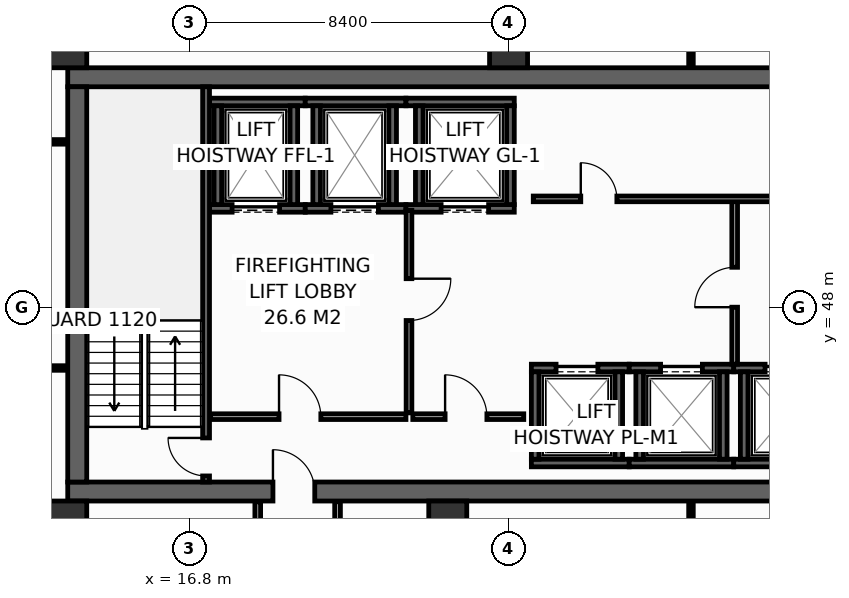
"""IFC4 building model, lengths in metres.
Left out: names, types, materials, properties, quantities, classifications, styles, units other than length and angle.
Written with IfcOpenShell. Run it as: python <this file> out.ifc"""

import sys

from ifc_helpers import new_model, si_unit, direction, frame, frame_2d, origin, origin_2d, place, context, subcontext, project, spatial, rectangle, hollow_rectangle, extrude, element, fill, save


model = new_model("IFC4")
c1 = context("Model", 3, precision=1e-05, world=origin(), true_north=direction((0.0, 1.0)))
c2 = subcontext(c1, "Body", "Model", "MODEL_VIEW")
j1 = project(units=[si_unit("LENGTHUNIT", "METRE"), si_unit("PLANEANGLEUNIT", "RADIAN")], contexts=[c1])
p1 = place(None, origin())
s1 = spatial("IfcSite", under=j1, at=p1, CompositionType="ELEMENT")
p2 = place(p1, origin())
s2 = spatial("IfcBuilding", under=s1, at=p2, CompositionType="ELEMENT")
p3 = place(p2, frame((0.0, 0.0, 141.0)))
s3 = spatial("IfcBuildingStorey", under=s2, at=p3, CompositionType="ELEMENT", Elevation=141.0)
p4 = place(p3, frame((13.6, 43.15, 0.0), z_axis=(0.0, 0.0, 1.0), x_axis=(1.0, 0.0, 0.0)))
e1 = element("IfcWall", 1, at=p4, inside=s3, PredefinedType="SHEAR", context=c2, shape_type="SweptSolid", body=[
    extrude(rectangle(XDim=32.7, YDim=0.5, at=frame_2d((16.35, 0.0))), origin(), (0.0, 0.0, 1.0), 3.55),
])
p5 = place(p4, frame((5.4, 0.0, 0.0)))
e2 = element("IfcOpeningElement", 2, at=p5, cuts=e1, PredefinedType="OPENING", context=c2, shape_type="SweptSolid", body=[
    extrude(rectangle(XDim=1.1, YDim=2.15, at=frame_2d((0.55, 1.075))), frame((0.0, 0.26, 0.0), z_axis=(0.0, -1.0, 0.0), x_axis=(1.0, 0.0, 0.0)), (0.0, 0.0, 1.0), 0.52),
])
p6 = place(p4, frame((25.6, 0.0, 0.0)))
e3 = element("IfcOpeningElement", 3, at=p6, cuts=e1, PredefinedType="OPENING", context=c2, shape_type="SweptSolid", body=[
    extrude(rectangle(XDim=1.1, YDim=2.15, at=frame_2d((0.55, 1.075))), frame((0.0, 0.26, 0.0), z_axis=(0.0, -1.0, 0.0), x_axis=(1.0, 0.0, 0.0)), (0.0, 0.0, 1.0), 0.52),
])
p7 = place(p3, frame((13.6, 54.05, 0.0), z_axis=(0.0, 0.0, 1.0), x_axis=(1.0, 0.0, 0.0)))
e4 = element("IfcWall", 4, at=p7, inside=s3, PredefinedType="SHEAR", context=c2, shape_type="SweptSolid", body=[
    extrude(rectangle(XDim=32.7, YDim=0.5, at=frame_2d((16.35, 0.0))), origin(), (0.0, 0.0, 1.0), 3.55),
])
p8 = place(p3, frame((13.85, 43.4, 0.0), z_axis=(0.0, 0.0, 1.0), x_axis=(0.0, 1.0, 0.0)))
e5 = element("IfcWall", 5, at=p8, inside=s3, PredefinedType="SHEAR", context=c2, shape_type="SweptSolid", body=[
    extrude(rectangle(XDim=10.4, YDim=0.5, at=frame_2d((5.2, 0.0))), origin(), (0.0, 0.0, 1.0), 3.55),
])
for number, where, z_axis, x_axis in (
    (6, (13.6, 54.8, 0.0), (0.0, 0.0, 1.0), (1.0, 0.0, 0.0)),
    (7, (25.2, 54.8, 0.0), (0.0, 0.0, 1.0), (1.0, 0.0, 0.0)),
    (8, (13.6, 42.4, 0.0), (0.0, 0.0, 1.0), (1.0, 0.0, 0.0)),
    (9, (23.6, 42.4, 0.0), (0.0, 0.0, 1.0), (1.0, 0.0, 0.0)),
):
    element("IfcColumn", number, at=place(p3, frame(where, z_axis=z_axis, x_axis=x_axis)), inside=s3, PredefinedType="COLUMN", context=c2, shape_type="SweptSolid", body=[
        extrude(hollow_rectangle(XDim=1.0, YDim=1.0, WallThickness=0.045, at=origin_2d()), origin(), (0.0, 0.0, 1.0), 3.8),
    ])
p9 = place(p3, frame((17.33, 50.6, 0.0), z_axis=(0.0, 0.0, 1.0), x_axis=(1.0, 0.0, 0.0)))
e10 = element("IfcWall", 10, at=p9, inside=s3, PredefinedType="SHEAR", context=c2, shape_type="SweptSolid", body=[
    extrude(rectangle(XDim=2.52, YDim=0.2, at=frame_2d((1.26, 0.0))), origin(), (0.0, 0.0, 1.0), 3.55),
])
p10 = place(p9, frame((0.595, 0.0, 0.0)))
e11 = element("IfcOpeningElement", 11, at=p10, cuts=e10, PredefinedType="OPENING", context=c2, shape_type="SweptSolid", body=[
    extrude(rectangle(XDim=1.25, YDim=2.3, at=frame_2d((0.625, 1.15))), frame((0.0, 0.11, 0.0), z_axis=(0.0, -1.0, 0.0), x_axis=(1.0, 0.0, 0.0)), (0.0, 0.0, 1.0), 0.22),
])
p11 = place(p3, frame((17.33, 53.4, 0.0), z_axis=(0.0, 0.0, 1.0), x_axis=(1.0, 0.0, 0.0)))
e12 = element("IfcWall", 12, at=p11, inside=s3, PredefinedType="SHEAR", context=c2, shape_type="SweptSolid", body=[
    extrude(rectangle(XDim=2.52, YDim=0.2, at=frame_2d((1.26, 0.0))), origin(), (0.0, 0.0, 1.0), 3.55),
])
for number, where, z_axis, x_axis in (
    (13, (17.55, 50.7, 0.0), (0.0, 0.0, 1.0), (0.0, 1.0, 0.0)),
    (14, (19.55, 50.7, 0.0), (0.0, 0.0, 1.0), (0.0, 1.0, 0.0)),
):
    element("IfcWall", number, at=place(p3, frame(where, z_axis=z_axis, x_axis=x_axis)), inside=s3, PredefinedType="SHEAR", context=c2, shape_type="SweptSolid", body=[
        extrude(rectangle(XDim=2.6, YDim=0.2, at=frame_2d((1.3, 0.0))), origin(), (0.0, 0.0, 1.0), 3.55),
    ])
p12 = place(p3, frame((19.85, 50.6, 0.0), z_axis=(0.0, 0.0, 1.0), x_axis=(1.0, 0.0, 0.0)))
e15 = element("IfcWall", 15, at=p12, inside=s3, PredefinedType="SHEAR", context=c2, shape_type="SweptSolid", body=[
    extrude(rectangle(XDim=2.65, YDim=0.2, at=frame_2d((1.325, 0.0))), origin(), (0.0, 0.0, 1.0), 3.55),
])
p13 = place(p12, frame((0.675, 0.0, 0.0)))
e16 = element("IfcOpeningElement", 16, at=p13, cuts=e15, PredefinedType="OPENING", context=c2, shape_type="SweptSolid", body=[
    extrude(rectangle(XDim=1.25, YDim=2.3, at=frame_2d((0.625, 1.15))), frame((0.0, 0.11, 0.0), z_axis=(0.0, -1.0, 0.0), x_axis=(1.0, 0.0, 0.0)), (0.0, 0.0, 1.0), 0.22),
])
p14 = place(p3, frame((19.85, 53.4, 0.0), z_axis=(0.0, 0.0, 1.0), x_axis=(1.0, 0.0, 0.0)))
e17 = element("IfcWall", 17, at=p14, inside=s3, PredefinedType="SHEAR", context=c2, shape_type="SweptSolid", body=[
    extrude(rectangle(XDim=2.65, YDim=0.2, at=frame_2d((1.325, 0.0))), origin(), (0.0, 0.0, 1.0), 3.55),
])
for number, where, z_axis, x_axis in (
    (18, (20.15, 50.7, 0.0), (0.0, 0.0, 1.0), (0.0, 1.0, 0.0)),
    (19, (22.15, 50.7, 0.0), (0.0, 0.0, 1.0), (0.0, 1.0, 0.0)),
):
    element("IfcWall", number, at=place(p3, frame(where, z_axis=z_axis, x_axis=x_axis)), inside=s3, PredefinedType="SHEAR", context=c2, shape_type="SweptSolid", body=[
        extrude(rectangle(XDim=2.6, YDim=0.2, at=frame_2d((1.3, 0.0))), origin(), (0.0, 0.0, 1.0), 3.55),
    ])
p15 = place(p3, frame((22.5, 50.6, 0.0), z_axis=(0.0, 0.0, 1.0), x_axis=(1.0, 0.0, 0.0)))
e20 = element("IfcWall", 20, at=p15, inside=s3, PredefinedType="SHEAR", context=c2, shape_type="SweptSolid", body=[
    extrude(rectangle(XDim=2.85, YDim=0.2, at=frame_2d((1.425, 0.0))), origin(), (0.0, 0.0, 1.0), 3.55),
])
p16 = place(p15, frame((0.925, 0.0, 0.0)))
e21 = element("IfcOpeningElement", 21, at=p16, cuts=e20, PredefinedType="OPENING", context=c2, shape_type="SweptSolid", body=[
    extrude(rectangle(XDim=1.25, YDim=2.3, at=frame_2d((0.625, 1.15))), frame((0.0, 0.11, 0.0), z_axis=(0.0, -1.0, 0.0), x_axis=(1.0, 0.0, 0.0)), (0.0, 0.0, 1.0), 0.22),
])
p17 = place(p3, frame((22.5, 53.4, 0.0), z_axis=(0.0, 0.0, 1.0), x_axis=(1.0, 0.0, 0.0)))
e22 = element("IfcWall", 22, at=p17, inside=s3, PredefinedType="SHEAR", context=c2, shape_type="SweptSolid", body=[
    extrude(rectangle(XDim=2.85, YDim=0.2, at=frame_2d((1.425, 0.0))), origin(), (0.0, 0.0, 1.0), 3.55),
])
for number, where, z_axis, x_axis in (
    (23, (22.85, 50.7, 0.0), (0.0, 0.0, 1.0), (0.0, 1.0, 0.0)),
    (24, (25.25, 50.7, 0.0), (0.0, 0.0, 1.0), (0.0, 1.0, 0.0)),
):
    element("IfcWall", number, at=place(p3, frame(where, z_axis=z_axis, x_axis=x_axis)), inside=s3, PredefinedType="SHEAR", context=c2, shape_type="SweptSolid", body=[
        extrude(rectangle(XDim=2.6, YDim=0.2, at=frame_2d((1.3, 0.0))), origin(), (0.0, 0.0, 1.0), 3.55),
    ])
p18 = place(p3, frame((25.8, 43.9, 0.0), z_axis=(0.0, 0.0, 1.0), x_axis=(1.0, 0.0, 0.0)))
e25 = element("IfcWall", 25, at=p18, inside=s3, PredefinedType="SHEAR", context=c2, shape_type="SweptSolid", body=[
    extrude(rectangle(XDim=2.575, YDim=0.2, at=frame_2d((1.288, 0.0))), origin(), (0.0, 0.0, 1.0), 3.55),
])
p19 = place(p3, frame((25.8, 46.4, 0.0), z_axis=(0.0, 0.0, 1.0), x_axis=(1.0, 0.0, 0.0)))
e26 = element("IfcWall", 26, at=p19, inside=s3, PredefinedType="SHEAR", context=c2, shape_type="SweptSolid", body=[
    extrude(rectangle(XDim=2.575, YDim=0.2, at=frame_2d((1.288, 0.0))), origin(), (0.0, 0.0, 1.0), 3.55),
])
p20 = place(p19, frame((0.65, 0.0, 0.0)))
e27 = element("IfcOpeningElement", 27, at=p20, cuts=e26, PredefinedType="OPENING", context=c2, shape_type="SweptSolid", body=[
    extrude(rectangle(XDim=1.1, YDim=2.2, at=frame_2d((0.55, 1.1))), frame((0.0, 0.11, 0.0), z_axis=(0.0, -1.0, 0.0), x_axis=(1.0, 0.0, 0.0)), (0.0, 0.0, 1.0), 0.22),
])
for number, where, z_axis, x_axis in (
    (28, (25.9, 44.0, 0.0), (0.0, 0.0, 1.0), (0.0, 1.0, 0.0)),
    (29, (28.1, 44.0, 0.0), (0.0, 0.0, 1.0), (0.0, 1.0, 0.0)),
):
    element("IfcWall", number, at=place(p3, frame(where, z_axis=z_axis, x_axis=x_axis)), inside=s3, PredefinedType="SHEAR", context=c2, shape_type="SweptSolid", body=[
        extrude(rectangle(XDim=2.3, YDim=0.2, at=frame_2d((1.15, 0.0))), origin(), (0.0, 0.0, 1.0), 3.55),
    ])
p21 = place(p3, frame((28.375, 43.9, 0.0), z_axis=(0.0, 0.0, 1.0), x_axis=(1.0, 0.0, 0.0)))
e30 = element("IfcWall", 30, at=p21, inside=s3, PredefinedType="SHEAR", context=c2, shape_type="SweptSolid", body=[
    extrude(rectangle(XDim=2.75, YDim=0.2, at=frame_2d((1.375, 0.0))), origin(), (0.0, 0.0, 1.0), 3.55),
])
p22 = place(p3, frame((28.375, 46.4, 0.0), z_axis=(0.0, 0.0, 1.0), x_axis=(1.0, 0.0, 0.0)))
e31 = element("IfcWall", 31, at=p22, inside=s3, PredefinedType="SHEAR", context=c2, shape_type="SweptSolid", body=[
    extrude(rectangle(XDim=2.75, YDim=0.2, at=frame_2d((1.375, 0.0))), origin(), (0.0, 0.0, 1.0), 3.55),
])
p23 = place(p22, frame((0.825, 0.0, 0.0)))
e32 = element("IfcOpeningElement", 32, at=p23, cuts=e31, PredefinedType="OPENING", context=c2, shape_type="SweptSolid", body=[
    extrude(rectangle(XDim=1.1, YDim=2.2, at=frame_2d((0.55, 1.1))), frame((0.0, 0.11, 0.0), z_axis=(0.0, -1.0, 0.0), x_axis=(1.0, 0.0, 0.0)), (0.0, 0.0, 1.0), 0.22),
])
for number, where, z_axis, x_axis in (
    (33, (28.65, 44.0, 0.0), (0.0, 0.0, 1.0), (0.0, 1.0, 0.0)),
    (34, (30.85, 44.0, 0.0), (0.0, 0.0, 1.0), (0.0, 1.0, 0.0)),
):
    element("IfcWall", number, at=place(p3, frame(where, z_axis=z_axis, x_axis=x_axis)), inside=s3, PredefinedType="SHEAR", context=c2, shape_type="SweptSolid", body=[
        extrude(rectangle(XDim=2.3, YDim=0.2, at=frame_2d((1.15, 0.0))), origin(), (0.0, 0.0, 1.0), 3.55),
    ])
p24 = place(p3, frame((31.125, 43.9, 0.0), z_axis=(0.0, 0.0, 1.0), x_axis=(1.0, 0.0, 0.0)))
e35 = element("IfcWall", 35, at=p24, inside=s3, PredefinedType="SHEAR", context=c2, shape_type="SweptSolid", body=[
    extrude(rectangle(XDim=2.575, YDim=0.2, at=frame_2d((1.288, 0.0))), origin(), (0.0, 0.0, 1.0), 3.55),
])
p25 = place(p3, frame((31.125, 46.4, 0.0), z_axis=(0.0, 0.0, 1.0), x_axis=(1.0, 0.0, 0.0)))
e36 = element("IfcWall", 36, at=p25, inside=s3, PredefinedType="SHEAR", context=c2, shape_type="SweptSolid", body=[
    extrude(rectangle(XDim=2.575, YDim=0.2, at=frame_2d((1.288, 0.0))), origin(), (0.0, 0.0, 1.0), 3.55),
])
p26 = place(p25, frame((0.825, 0.0, 0.0)))
e37 = element("IfcOpeningElement", 37, at=p26, cuts=e36, PredefinedType="OPENING", context=c2, shape_type="SweptSolid", body=[
    extrude(rectangle(XDim=1.1, YDim=2.2, at=frame_2d((0.55, 1.1))), frame((0.0, 0.11, 0.0), z_axis=(0.0, -1.0, 0.0), x_axis=(1.0, 0.0, 0.0)), (0.0, 0.0, 1.0), 0.22),
])
p27 = place(p3, frame((31.4, 44.0, 0.0), z_axis=(0.0, 0.0, 1.0), x_axis=(0.0, 1.0, 0.0)))
e38 = element("IfcWall", 38, at=p27, inside=s3, PredefinedType="SHEAR", context=c2, shape_type="SweptSolid", body=[
    extrude(rectangle(XDim=2.3, YDim=0.2, at=frame_2d((1.15, 0.0))), origin(), (0.0, 0.0, 1.0), 3.55),
])
p28 = place(p3, frame((17.24, 43.4, 0.0), z_axis=(0.0, 0.0, 1.0), x_axis=(0.0, 1.0, 0.0)))
e39 = element("IfcWall", 39, at=p28, inside=s3, PredefinedType="SHEAR", context=c2, shape_type="SweptSolid", body=[
    extrude(rectangle(XDim=10.4, YDim=0.18, at=frame_2d((5.2, 0.0))), origin(), (0.0, 0.0, 1.0), 3.55),
])
p29 = place(p28, frame((0.16, 0.0, 0.0)))
e40 = element("IfcOpeningElement", 40, at=p29, cuts=e39, PredefinedType="OPENING", context=c2, shape_type="SweptSolid", body=[
    extrude(rectangle(XDim=1.0, YDim=2.15, at=frame_2d((0.5, 1.075))), frame((0.0, 0.1, 0.0), z_axis=(0.0, -1.0, 0.0), x_axis=(1.0, 0.0, 0.0)), (0.0, 0.0, 1.0), 0.2),
])
p30 = place(p3, frame((17.36, 45.12, 0.0), z_axis=(0.0, 0.0, 1.0), x_axis=(1.0, 0.0, 0.0)))
e41 = element("IfcWall", 41, at=p30, inside=s3, PredefinedType="PARTITIONING", context=c2, shape_type="SweptSolid", body=[
    extrude(rectangle(XDim=5.14, YDim=0.15, at=frame_2d((2.57, 0.0))), origin(), (0.0, 0.0, 1.0), 3.55),
])
p31 = place(p30, frame((1.8, 0.0, 0.0)))
e42 = element("IfcOpeningElement", 42, at=p31, cuts=e41, PredefinedType="OPENING", context=c2, shape_type="SweptSolid", body=[
    extrude(rectangle(XDim=1.1, YDim=2.15, at=frame_2d((0.55, 1.075))), frame((0.0, 0.085, 0.0), z_axis=(0.0, -1.0, 0.0), x_axis=(1.0, 0.0, 0.0)), (0.0, 0.0, 1.0), 0.17),
])
p32 = place(p3, frame((22.58, 50.55, 0.0), z_axis=(0.0, 0.0, 1.0), x_axis=(0.0, -1.0, 0.0)))
e43 = element("IfcWall", 43, at=p32, inside=s3, PredefinedType="PARTITIONING", context=c2, shape_type="SweptSolid", body=[
    extrude(rectangle(XDim=5.33, YDim=0.15, at=frame_2d((2.665, 0.0))), origin(), (0.0, 0.0, 1.0), 3.55),
])
p33 = place(p32, frame((1.8, 0.0, 0.0)))
e44 = element("IfcOpeningElement", 44, at=p33, cuts=e43, PredefinedType="OPENING", context=c2, shape_type="SweptSolid", body=[
    extrude(rectangle(XDim=1.1, YDim=2.15, at=frame_2d((0.55, 1.075))), frame((0.0, 0.085, 0.0), z_axis=(0.0, -1.0, 0.0), x_axis=(1.0, 0.0, 0.0)), (0.0, 0.0, 1.0), 0.17),
])
p34 = place(p3, frame((22.68, 45.12, 0.0), z_axis=(0.0, 0.0, 1.0), x_axis=(1.0, 0.0, 0.0)))
e45 = element("IfcWall", 45, at=p34, inside=s3, PredefinedType="PARTITIONING", context=c2, shape_type="SweptSolid", body=[
    extrude(rectangle(XDim=2.92, YDim=0.15, at=frame_2d((1.46, 0.0))), origin(), (0.0, 0.0, 1.0), 3.55),
])
p35 = place(p34, frame((0.85, 0.0, 0.0)))
e46 = element("IfcOpeningElement", 46, at=p35, cuts=e45, PredefinedType="OPENING", context=c2, shape_type="SweptSolid", body=[
    extrude(rectangle(XDim=1.1, YDim=2.15, at=frame_2d((0.55, 1.075))), frame((0.0, 0.085, 0.0), z_axis=(0.0, -1.0, 0.0), x_axis=(1.0, 0.0, 0.0)), (0.0, 0.0, 1.0), 0.17),
])
p36 = place(p3, frame((31.15, 46.5, 0.0), z_axis=(0.0, 0.0, 1.0), x_axis=(0.0, 1.0, 0.0)))
e47 = element("IfcWall", 47, at=p36, inside=s3, PredefinedType="PARTITIONING", context=c2, shape_type="SweptSolid", body=[
    extrude(rectangle(XDim=4.35, YDim=0.15, at=frame_2d((2.175, 0.0))), origin(), (0.0, 0.0, 1.0), 3.55),
])
p37 = place(p36, frame((1.5, 0.0, 0.0)))
e48 = element("IfcOpeningElement", 48, at=p37, cuts=e47, PredefinedType="OPENING", context=c2, shape_type="SweptSolid", body=[
    extrude(rectangle(XDim=1.05, YDim=2.15, at=frame_2d((0.525, 1.075))), frame((0.0, 0.085, 0.0), z_axis=(0.0, -1.0, 0.0), x_axis=(1.0, 0.0, 0.0)), (0.0, 0.0, 1.0), 0.17),
])
p38 = place(p3, frame((25.85, 50.85, 0.0), z_axis=(0.0, 0.0, 1.0), x_axis=(1.0, 0.0, 0.0)))
e49 = element("IfcWall", 49, at=p38, inside=s3, PredefinedType="PARTITIONING", context=c2, shape_type="SweptSolid", body=[
    extrude(rectangle(XDim=7.65, YDim=0.15, at=frame_2d((3.825, 0.0))), origin(), (0.0, 0.0, 1.0), 3.55),
])
p39 = place(p38, frame((1.25, 0.0, 0.0)))
e50 = element("IfcOpeningElement", 50, at=p39, cuts=e49, PredefinedType="OPENING", context=c2, shape_type="SweptSolid", body=[
    extrude(rectangle(XDim=0.95, YDim=2.15, at=frame_2d((0.475, 1.075))), frame((0.0, 0.085, 0.0), z_axis=(0.0, -1.0, 0.0), x_axis=(1.0, 0.0, 0.0)), (0.0, 0.0, 1.0), 0.17),
])
p40 = place(p3, frame((11.55, 52.35, 0.0), z_axis=(0.0, 0.0, 1.0), x_axis=(1.0, 0.0, 0.0)))
e51 = element("IfcWall", 51, at=p40, inside=s3, PredefinedType="PARTITIONING", context=c2, shape_type="SweptSolid", body=[
    extrude(rectangle(XDim=2.03, YDim=0.12, at=frame_2d((1.015, 0.0))), origin(), (0.0, 0.0, 1.0), 3.55),
])
p41 = place(p3, frame((30.0, 54.32, 0.0), z_axis=(0.0, 0.0, 1.0), x_axis=(0.0, 1.0, 0.0)))
e52 = element("IfcWall", 52, at=p41, inside=s3, PredefinedType="PARTITIONING", context=c2, shape_type="SweptSolid", body=[
    extrude(rectangle(XDim=1.675, YDim=0.12, at=frame_2d((0.837, 0.0))), origin(), (0.0, 0.0, 1.0), 2.935),
])
p42 = place(p3, frame((11.55, 46.4, 0.0), z_axis=(0.0, 0.0, 1.0), x_axis=(1.0, 0.0, 0.0)))
e53 = element("IfcWall", 53, at=p42, inside=s3, PredefinedType="PARTITIONING", context=c2, shape_type="SweptSolid", body=[
    extrude(rectangle(XDim=2.03, YDim=0.12, at=frame_2d((1.015, 0.0))), origin(), (0.0, 0.0, 1.0), 3.55),
])
p43 = place(p3, frame((13.8, 41.03, 0.0), z_axis=(0.0, 0.0, 1.0), x_axis=(0.0, 1.0, 0.0)))
e54 = element("IfcWall", 54, at=p43, inside=s3, PredefinedType="PARTITIONING", context=c2, shape_type="SweptSolid", body=[
    extrude(rectangle(XDim=1.85, YDim=0.15, at=frame_2d((0.925, 0.0))), origin(), (0.0, 0.0, 1.0), 3.55),
])
for number, where, z_axis, x_axis in (
    (55, (18.6, 40.95, 0.0), (0.0, 0.0, 1.0), (0.0, 1.0, 0.0)),
    (56, (20.7, 40.95, 0.0), (0.0, 0.0, 1.0), (0.0, 1.0, 0.0)),
):
    element("IfcWall", number, at=place(p3, frame(where, z_axis=z_axis, x_axis=x_axis)), inside=s3, PredefinedType="PARTITIONING", context=c2, shape_type="SweptSolid", body=[
        extrude(rectangle(XDim=1.93, YDim=0.15, at=frame_2d((0.965, 0.0))), origin(), (0.0, 0.0, 1.0), 3.55),
    ])
p44 = place(p3, frame((30.0, 40.95, 0.0), z_axis=(0.0, 0.0, 1.0), x_axis=(0.0, 1.0, 0.0)))
e57 = element("IfcWall", 57, at=p44, inside=s3, PredefinedType="PARTITIONING", context=c2, shape_type="SweptSolid", body=[
    extrude(rectangle(XDim=1.93, YDim=0.12, at=frame_2d((0.965, 0.0))), origin(), (0.0, 0.0, 1.0), 2.835),
])
p45 = place(p10, origin())
e58 = element("IfcDoor", 58, at=p45, inside=s3, OperationType="SLIDING_TO_LEFT", PredefinedType="DOOR", context=c2, shape_type="SweptSolid", body=[
    extrude(rectangle(XDim=1.25, YDim=2.3, at=frame_2d((0.625, 1.15))), frame((0.0, 0.025, 0.0), z_axis=(0.0, -1.0, 0.0), x_axis=(1.0, 0.0, 0.0)), (0.0, 0.0, 1.0), 0.05),
])
fill(e11, e58)
p46 = place(p13, origin())
e59 = element("IfcDoor", 59, at=p46, inside=s3, OperationType="SLIDING_TO_LEFT", PredefinedType="DOOR", context=c2, shape_type="SweptSolid", body=[
    extrude(rectangle(XDim=1.25, YDim=2.3, at=frame_2d((0.625, 1.15))), frame((0.0, 0.025, 0.0), z_axis=(0.0, -1.0, 0.0), x_axis=(1.0, 0.0, 0.0)), (0.0, 0.0, 1.0), 0.05),
])
fill(e16, e59)
p47 = place(p16, origin())
e60 = element("IfcDoor", 60, at=p47, inside=s3, OperationType="SLIDING_TO_LEFT", PredefinedType="DOOR", context=c2, shape_type="SweptSolid", body=[
    extrude(rectangle(XDim=1.25, YDim=2.3, at=frame_2d((0.625, 1.15))), frame((0.0, 0.025, 0.0), z_axis=(0.0, -1.0, 0.0), x_axis=(1.0, 0.0, 0.0)), (0.0, 0.0, 1.0), 0.05),
])
fill(e21, e60)
p48 = place(p20, origin())
e61 = element("IfcDoor", 61, at=p48, inside=s3, OperationType="SLIDING_TO_LEFT", PredefinedType="DOOR", context=c2, shape_type="SweptSolid", body=[
    extrude(rectangle(XDim=1.1, YDim=2.2, at=frame_2d((0.55, 1.1))), frame((0.0, 0.025, 0.0), z_axis=(0.0, -1.0, 0.0), x_axis=(1.0, 0.0, 0.0)), (0.0, 0.0, 1.0), 0.05),
])
fill(e27, e61)
p49 = place(p23, origin())
e62 = element("IfcDoor", 62, at=p49, inside=s3, OperationType="SLIDING_TO_LEFT", PredefinedType="DOOR", context=c2, shape_type="SweptSolid", body=[
    extrude(rectangle(XDim=1.1, YDim=2.2, at=frame_2d((0.55, 1.1))), frame((0.0, 0.025, 0.0), z_axis=(0.0, -1.0, 0.0), x_axis=(1.0, 0.0, 0.0)), (0.0, 0.0, 1.0), 0.05),
])
fill(e32, e62)
p50 = place(p26, origin())
e63 = element("IfcDoor", 63, at=p50, inside=s3, OperationType="SLIDING_TO_LEFT", PredefinedType="DOOR", context=c2, shape_type="SweptSolid", body=[
    extrude(rectangle(XDim=1.1, YDim=2.2, at=frame_2d((0.55, 1.1))), frame((0.0, 0.025, 0.0), z_axis=(0.0, -1.0, 0.0), x_axis=(1.0, 0.0, 0.0)), (0.0, 0.0, 1.0), 0.05),
])
fill(e37, e63)
p51 = place(p29, origin())
e64 = element("IfcDoor", 64, at=p51, inside=s3, OperationType="SINGLE_SWING_RIGHT", PredefinedType="DOOR", context=c2, shape_type="SweptSolid", body=[
    extrude(rectangle(XDim=1.0, YDim=2.15, at=frame_2d((0.5, 1.075))), frame((0.0, 0.025, 0.0), z_axis=(0.0, -1.0, 0.0), x_axis=(1.0, 0.0, 0.0)), (0.0, 0.0, 1.0), 0.05),
])
fill(e40, e64)
p52 = place(p31, origin())
e65 = element("IfcDoor", 65, at=p52, inside=s3, OperationType="SINGLE_SWING_LEFT", PredefinedType="DOOR", context=c2, shape_type="SweptSolid", body=[
    extrude(rectangle(XDim=1.1, YDim=2.15, at=frame_2d((0.55, 1.075))), frame((0.0, 0.025, 0.0), z_axis=(0.0, -1.0, 0.0), x_axis=(1.0, 0.0, 0.0)), (0.0, 0.0, 1.0), 0.05),
])
fill(e42, e65)
p53 = place(p33, origin())
e66 = element("IfcDoor", 66, at=p53, inside=s3, OperationType="SINGLE_SWING_LEFT", PredefinedType="DOOR", context=c2, shape_type="SweptSolid", body=[
    extrude(rectangle(XDim=1.1, YDim=2.15, at=frame_2d((0.55, 1.075))), frame((0.0, 0.025, 0.0), z_axis=(0.0, -1.0, 0.0), x_axis=(1.0, 0.0, 0.0)), (0.0, 0.0, 1.0), 0.05),
])
fill(e44, e66)
p54 = place(p35, origin())
e67 = element("IfcDoor", 67, at=p54, inside=s3, OperationType="SINGLE_SWING_LEFT", PredefinedType="DOOR", context=c2, shape_type="SweptSolid", body=[
    extrude(rectangle(XDim=1.1, YDim=2.15, at=frame_2d((0.55, 1.075))), frame((0.0, 0.025, 0.0), z_axis=(0.0, -1.0, 0.0), x_axis=(1.0, 0.0, 0.0)), (0.0, 0.0, 1.0), 0.05),
])
fill(e46, e67)
p55 = place(p5, origin())
e68 = element("IfcDoor", 68, at=p55, inside=s3, OperationType="SINGLE_SWING_LEFT", PredefinedType="DOOR", context=c2, shape_type="SweptSolid", body=[
    extrude(rectangle(XDim=1.1, YDim=2.15, at=frame_2d((0.55, 1.075))), frame((0.0, 0.025, 0.0), z_axis=(0.0, -1.0, 0.0), x_axis=(1.0, 0.0, 0.0)), (0.0, 0.0, 1.0), 0.05),
])
fill(e2, e68)
p56 = place(p37, origin())
e69 = element("IfcDoor", 69, at=p56, inside=s3, OperationType="SINGLE_SWING_LEFT", PredefinedType="DOOR", context=c2, shape_type="SweptSolid", body=[
    extrude(rectangle(XDim=1.05, YDim=2.15, at=frame_2d((0.525, 1.075))), frame((0.0, 0.025, 0.0), z_axis=(0.0, -1.0, 0.0), x_axis=(1.0, 0.0, 0.0)), (0.0, 0.0, 1.0), 0.05),
])
fill(e48, e69)
p57 = place(p39, origin())
e70 = element("IfcDoor", 70, at=p57, inside=s3, OperationType="SINGLE_SWING_LEFT", PredefinedType="DOOR", context=c2, shape_type="SweptSolid", body=[
    extrude(rectangle(XDim=0.95, YDim=2.15, at=frame_2d((0.475, 1.075))), frame((0.0, 0.025, 0.0), z_axis=(0.0, -1.0, 0.0), x_axis=(1.0, 0.0, 0.0)), (0.0, 0.0, 1.0), 0.05),
])
fill(e50, e70)
save(model, sys.argv[1])
